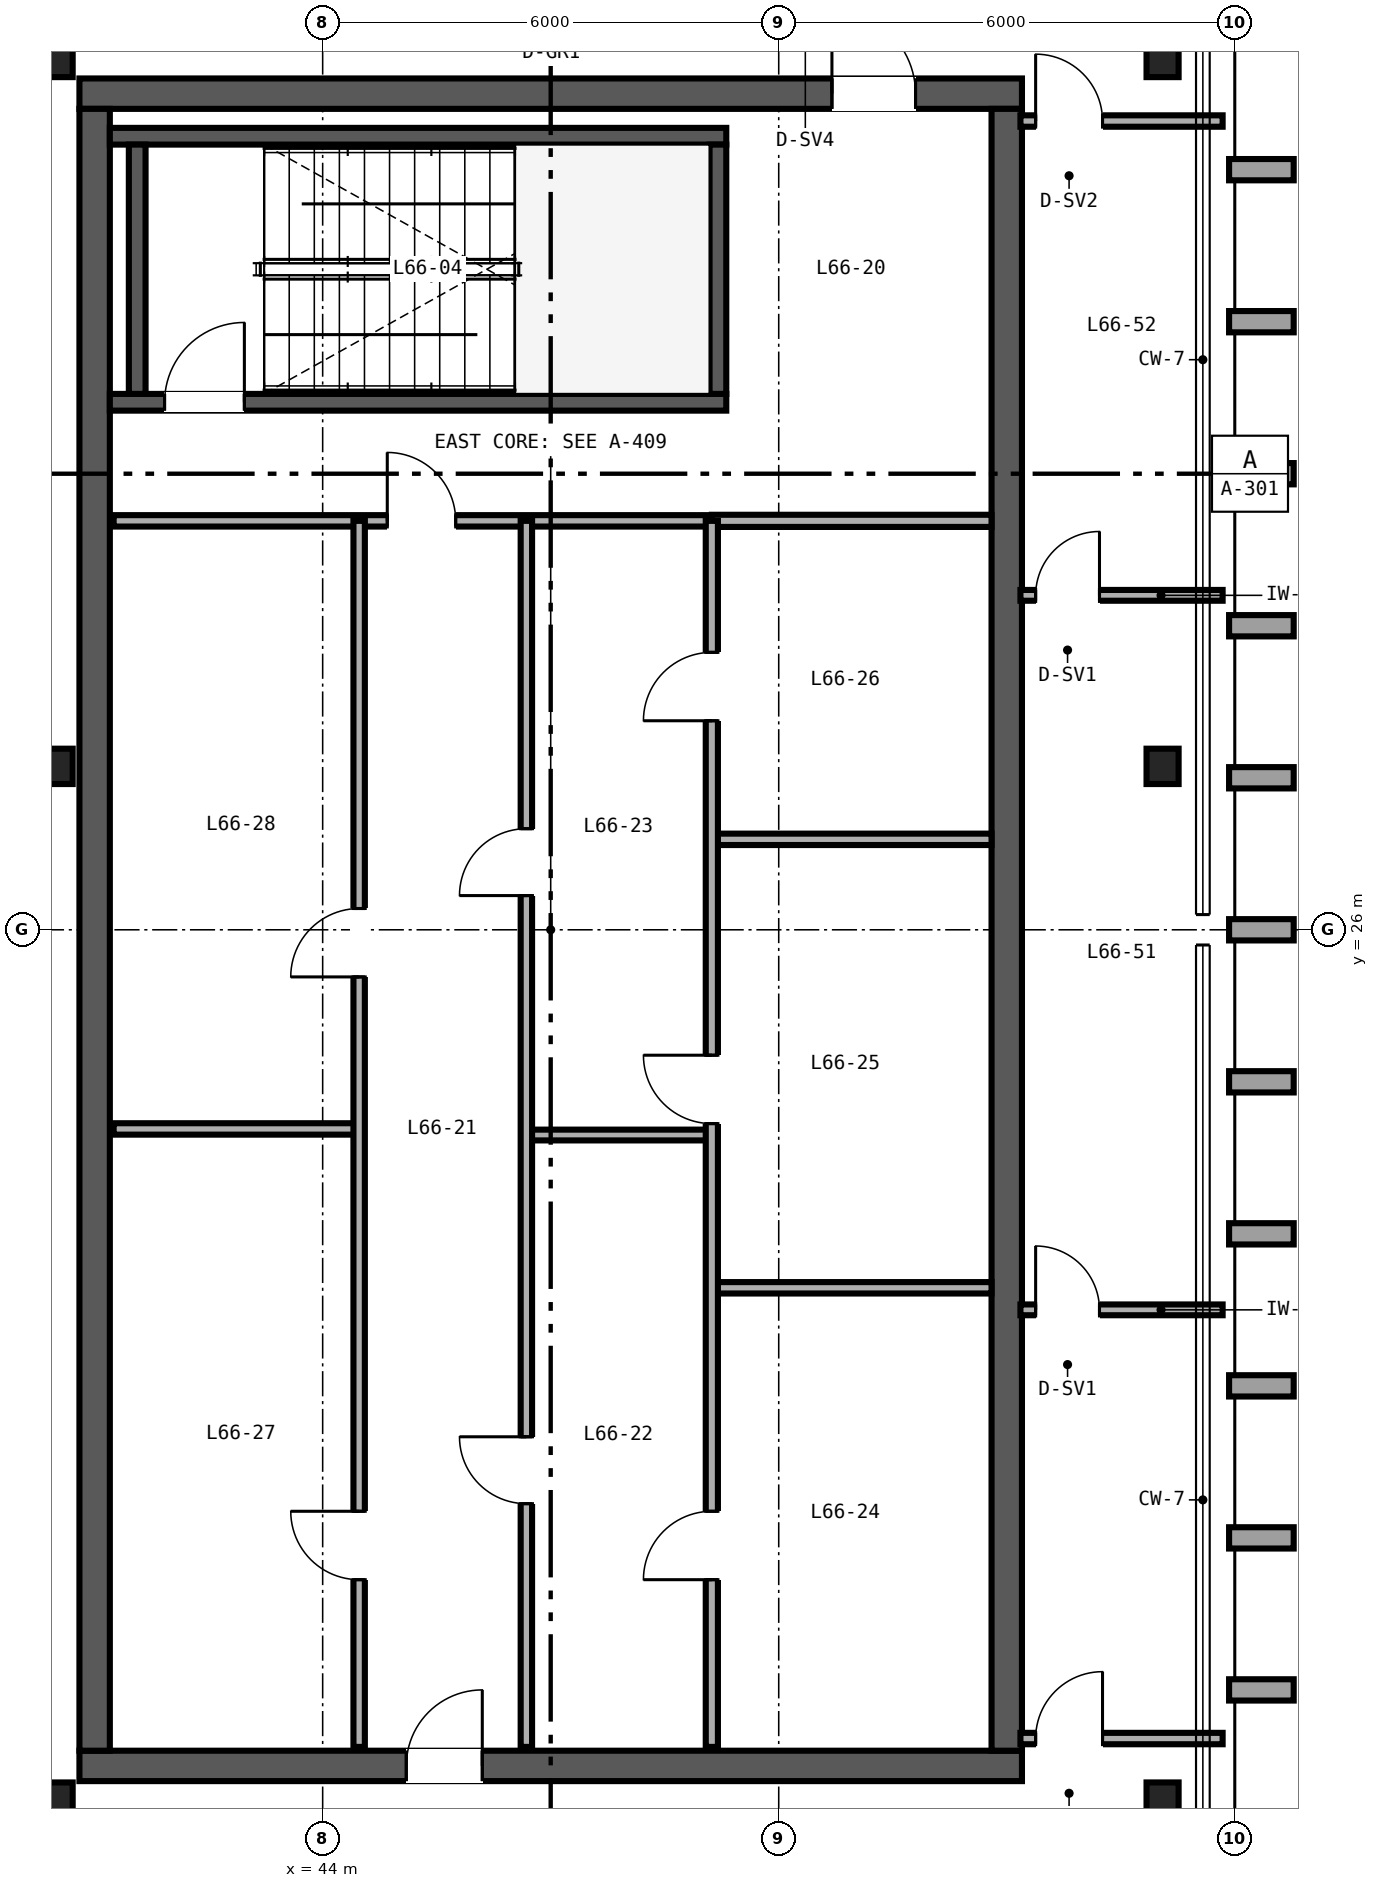
"""IFC4 building model, lengths in metres.
Left out: names, types, materials, properties, quantities, classifications, styles, units other than length and angle.
Written with IfcOpenShell. Run it as: python <this file> out.ifc"""

import sys

from ifc_helpers import new_model, si_unit, direction, frame, frame_2d, origin, origin_2d, place, context, subcontext, project, spatial, rectangle, i_section, extrude, source, transform, mapped, element, fill, save


model = new_model("IFC4")
c1 = context("Model", 3, precision=1e-05, world=origin(), true_north=direction((0.0, 1.0)))
c2 = subcontext(c1, "Body", "Model", "MODEL_VIEW")
j1 = project(units=[si_unit("LENGTHUNIT", "METRE"), si_unit("PLANEANGLEUNIT", "RADIAN")], contexts=[c1])
p1 = place(None, origin())
s1 = spatial("IfcSite", under=j1, at=p1, CompositionType="ELEMENT")
p2 = place(p1, origin())
s2 = spatial("IfcBuilding", under=s1, at=p2, CompositionType="ELEMENT")
p3 = place(p2, frame((0.0, 0.0, 261.6)))
s3 = spatial("IfcBuildingStorey", under=s2, at=p3, CompositionType="ELEMENT", Elevation=261.6)
p4 = place(p3, frame((40.8, 15.0, 0.0), z_axis=(0.0, 0.0, 1.0), x_axis=(1.0, 0.0, 0.0)))
e1 = element("IfcWall", 1, at=p4, inside=s3, PredefinedType="SHEAR", context=c2, shape_type="SweptSolid", body=[
    extrude(rectangle(XDim=12.4, YDim=0.4, at=frame_2d((6.2, 0.0))), origin(), (0.0, 0.0, 1.0), 3.38),
])
p5 = place(p4, frame((4.3, 0.0, 0.0)))
e2 = element("IfcOpeningElement", 2, at=p5, cuts=e1, PredefinedType="OPENING", context=c2, shape_type="SweptSolid", body=[
    extrude(rectangle(XDim=1.0, YDim=2.15, at=frame_2d((0.5, 1.075))), frame((0.0, 0.21, 0.0), z_axis=(0.0, -1.0, 0.0), x_axis=(1.0, 0.0, 0.0)), (0.0, 0.0, 1.0), 0.42),
])
p6 = place(p3, frame((40.8, 37.0, 0.0), z_axis=(0.0, 0.0, 1.0), x_axis=(1.0, 0.0, 0.0)))
e3 = element("IfcWall", 3, at=p6, inside=s3, PredefinedType="SHEAR", context=c2, shape_type="SweptSolid", body=[
    extrude(rectangle(XDim=12.4, YDim=0.4, at=frame_2d((6.2, 0.0))), origin(), (0.0, 0.0, 1.0), 3.38),
])
p7 = place(p6, frame((9.9, 0.0, 0.0)))
e4 = element("IfcOpeningElement", 4, at=p7, cuts=e3, PredefinedType="OPENING", context=c2, shape_type="SweptSolid", body=[
    extrude(rectangle(XDim=1.1, YDim=2.15, at=frame_2d((0.55, 1.075))), frame((0.0, 0.21, 0.0), z_axis=(0.0, -1.0, 0.0), x_axis=(1.0, 0.0, 0.0)), (0.0, 0.0, 1.0), 0.42),
])
for number, where, z_axis, x_axis in (
    (5, (41.0, 15.2, 0.0), (0.0, 0.0, 1.0), (0.0, 1.0, 0.0)),
    (6, (53.0, 15.2, 0.0), (0.0, 0.0, 1.0), (0.0, 1.0, 0.0)),
):
    element("IfcWall", number, at=place(p3, frame(where, z_axis=z_axis, x_axis=x_axis)), inside=s3, PredefinedType="SHEAR", context=c2, shape_type="SweptSolid", body=[
        extrude(rectangle(XDim=21.6, YDim=0.4, at=frame_2d((10.8, 0.0))), origin(), (0.0, 0.0, 1.0), 3.38),
    ])
p8 = place(p3, frame((41.2, 32.94, 0.0), z_axis=(0.0, 0.0, 1.0), x_axis=(1.0, 0.0, 0.0)))
e7 = element("IfcWall", 7, at=p8, inside=s3, PredefinedType="SHEAR", context=c2, shape_type="SweptSolid", body=[
    extrude(rectangle(XDim=8.11, YDim=0.22, at=frame_2d((4.055, 0.0))), origin(), (0.0, 0.0, 1.0), 3.4),
])
p9 = place(p8, frame((0.72, 0.0, 0.0)))
e8 = element("IfcOpeningElement", 8, at=p9, cuts=e7, PredefinedType="OPENING", context=c2, shape_type="SweptSolid", body=[
    extrude(rectangle(XDim=1.05, YDim=2.15, at=frame_2d((0.525, 1.075))), frame((0.0, 0.12, 0.0), z_axis=(0.0, -1.0, 0.0), x_axis=(1.0, 0.0, 0.0)), (0.0, 0.0, 1.0), 0.24),
])
p10 = place(p3, frame((41.2, 36.44, 0.0), z_axis=(0.0, 0.0, 1.0), x_axis=(1.0, 0.0, 0.0)))
e9 = element("IfcWall", 9, at=p10, inside=s3, PredefinedType="SHEAR", context=c2, shape_type="SweptSolid", body=[
    extrude(rectangle(XDim=8.11, YDim=0.22, at=frame_2d((4.055, 0.0))), origin(), (0.0, 0.0, 1.0), 3.4),
])
for number, where, z_axis, x_axis in (
    (10, (41.56, 33.05, 0.0), (0.0, 0.0, 1.0), (0.0, 1.0, 0.0)),
    (11, (49.2, 33.05, 0.0), (0.0, 0.0, 1.0), (0.0, 1.0, 0.0)),
):
    element("IfcWall", number, at=place(p3, frame(where, z_axis=z_axis, x_axis=x_axis)), inside=s3, PredefinedType="SHEAR", context=c2, shape_type="SweptSolid", body=[
        extrude(rectangle(XDim=3.28, YDim=0.22, at=frame_2d((1.64, 0.0))), origin(), (0.0, 0.0, 1.0), 3.4),
    ])
m1 = source(origin(), c2, "Body", "SweptSolid", [
    extrude(i_section(OverallWidth=0.422, OverallDepth=0.465, WebThickness=0.045, FlangeThickness=0.073, FilletRadius=0.025, at=origin_2d()), origin(), (0.0, 0.0, 1.0), 3.38),
])
for number, where, z_axis, x_axis in (
    (12, (40.5, 14.55, 0.0), (0.0, 0.0, 1.0), (1.0, 0.0, 0.0)),
    (13, (55.05, 14.55, 0.0), (0.0, 0.0, 1.0), (1.0, 0.0, 0.0)),
    (14, (40.5, 28.15, 0.0), (0.0, 0.0, 1.0), (1.0, 0.0, 0.0)),
    (15, (55.05, 28.15, 0.0), (0.0, 0.0, 1.0), (1.0, 0.0, 0.0)),
    (16, (40.5, 37.45, 0.0), (0.0, 0.0, 1.0), (1.0, 0.0, 0.0)),
    (17, (55.05, 37.45, 0.0), (0.0, 0.0, 1.0), (1.0, 0.0, 0.0)),
):
    element("IfcColumn", number, at=place(p3, frame(where, z_axis=z_axis, x_axis=x_axis)), inside=s3, PredefinedType="COLUMN", context=c2, shape_type="MappedRepresentation", body=[
        mapped(m1, transform((0.0, 0.0, 0.0), scale=1.0)),
    ])
p11 = place(p3, frame((41.25, 31.38, 0.0), z_axis=(0.0, 0.0, 1.0), x_axis=(1.0, 0.0, 0.0)))
e18 = element("IfcWall", 18, at=p11, inside=s3, PredefinedType="PARTITIONING", context=c2, shape_type="SweptSolid", body=[
    extrude(rectangle(XDim=7.87, YDim=0.15, at=frame_2d((3.935, 0.0))), origin(), (0.0, 0.0, 1.0), 2.48),
])
p12 = place(p11, frame((3.6, 0.0, 0.0)))
e19 = element("IfcOpeningElement", 19, at=p12, cuts=e18, PredefinedType="OPENING", context=c2, shape_type="SweptSolid", body=[
    extrude(rectangle(XDim=0.9, YDim=2.15, at=frame_2d((0.45, 1.075))), frame((0.0, 0.085, 0.0), z_axis=(0.0, -1.0, 0.0), x_axis=(1.0, 0.0, 0.0)), (0.0, 0.0, 1.0), 0.17),
])
p13 = place(p3, frame((46.68, 23.3, 0.0), z_axis=(0.0, 0.0, 1.0), x_axis=(1.0, 0.0, 0.0)))
e20 = element("IfcWall", 20, at=p13, inside=s3, PredefinedType="PARTITIONING", context=c2, shape_type="SweptSolid", body=[
    extrude(rectangle(XDim=2.44, YDim=0.142, at=frame_2d((1.22, 0.0))), origin(), (0.0, 0.0, 1.0), 3.38),
])
p14 = place(p3, frame((46.68, 15.25, 0.0), z_axis=(0.0, 0.0, 1.0), x_axis=(0.0, 1.0, 0.0)))
e21 = element("IfcWall", 21, at=p14, inside=s3, PredefinedType="PARTITIONING", context=c2, shape_type="SweptSolid", body=[
    extrude(rectangle(XDim=16.13, YDim=0.15, at=frame_2d((8.065, 0.0))), origin(), (0.0, 0.0, 1.0), 2.453),
])
p15 = place(p14, frame((3.2, 0.0, 0.0)))
e22 = element("IfcOpeningElement", 22, at=p15, cuts=e21, PredefinedType="OPENING", context=c2, shape_type="SweptSolid", body=[
    extrude(rectangle(XDim=0.88, YDim=2.15, at=frame_2d((0.44, 1.075))), frame((0.0, 0.085, 0.0), z_axis=(0.0, -1.0, 0.0), x_axis=(1.0, 0.0, 0.0)), (0.0, 0.0, 1.0), 0.17),
])
p16 = place(p14, frame((11.2, 0.0, 0.0)))
e23 = element("IfcOpeningElement", 23, at=p16, cuts=e21, PredefinedType="OPENING", context=c2, shape_type="SweptSolid", body=[
    extrude(rectangle(XDim=0.88, YDim=2.15, at=frame_2d((0.44, 1.075))), frame((0.0, 0.085, 0.0), z_axis=(0.0, -1.0, 0.0), x_axis=(1.0, 0.0, 0.0)), (0.0, 0.0, 1.0), 0.17),
])
p17 = place(p3, frame((49.12, 31.38, 0.0), z_axis=(0.0, 0.0, 1.0), x_axis=(1.0, 0.0, 0.0)))
e24 = element("IfcWall", 24, at=p17, inside=s3, PredefinedType="PARTITIONING", context=c2, shape_type="SweptSolid", body=[
    extrude(rectangle(XDim=3.68, YDim=0.16, at=frame_2d((1.84, 0.0))), origin(), (0.0, 0.0, 1.0), 2.48),
])
for number, where, z_axis, x_axis in (
    (25, (49.12, 21.29, 0.0), (0.0, 0.0, 1.0), (1.0, 0.0, 0.0)),
    (26, (49.12, 27.19, 0.0), (0.0, 0.0, 1.0), (1.0, 0.0, 0.0)),
):
    element("IfcWall", number, at=place(p3, frame(where, z_axis=z_axis, x_axis=x_axis)), inside=s3, PredefinedType="PARTITIONING", context=c2, shape_type="SweptSolid", body=[
        extrude(rectangle(XDim=3.68, YDim=0.15, at=frame_2d((1.84, 0.0))), origin(), (0.0, 0.0, 1.0), 3.38),
    ])
p18 = place(p3, frame((49.12, 15.25, 0.0), z_axis=(0.0, 0.0, 1.0), x_axis=(0.0, 1.0, 0.0)))
e27 = element("IfcWall", 27, at=p18, inside=s3, PredefinedType="PARTITIONING", context=c2, shape_type="SweptSolid", body=[
    extrude(rectangle(XDim=16.13, YDim=0.16, at=frame_2d((8.065, 0.0))), origin(), (0.0, 0.0, 1.0), 2.453),
])
p19 = place(p18, frame((2.2, 0.0, 0.0)))
e28 = element("IfcOpeningElement", 28, at=p19, cuts=e27, PredefinedType="OPENING", context=c2, shape_type="SweptSolid", body=[
    extrude(rectangle(XDim=0.9, YDim=2.15, at=frame_2d((0.45, 1.075))), frame((0.0, 0.09, 0.0), z_axis=(0.0, -1.0, 0.0), x_axis=(1.0, 0.0, 0.0)), (0.0, 0.0, 1.0), 0.18),
])
p20 = place(p18, frame((8.2, 0.0, 0.0)))
e29 = element("IfcOpeningElement", 29, at=p20, cuts=e27, PredefinedType="OPENING", context=c2, shape_type="SweptSolid", body=[
    extrude(rectangle(XDim=0.9, YDim=2.15, at=frame_2d((0.45, 1.075))), frame((0.0, 0.09, 0.0), z_axis=(0.0, -1.0, 0.0), x_axis=(1.0, 0.0, 0.0)), (0.0, 0.0, 1.0), 0.18),
])
p21 = place(p18, frame((13.5, 0.0, 0.0)))
e30 = element("IfcOpeningElement", 30, at=p21, cuts=e27, PredefinedType="OPENING", context=c2, shape_type="SweptSolid", body=[
    extrude(rectangle(XDim=0.9, YDim=2.15, at=frame_2d((0.45, 1.075))), frame((0.0, 0.09, 0.0), z_axis=(0.0, -1.0, 0.0), x_axis=(1.0, 0.0, 0.0)), (0.0, 0.0, 1.0), 0.18),
])
p22 = place(p3, frame((41.25, 23.38, 0.0), z_axis=(0.0, 0.0, 1.0), x_axis=(1.0, 0.0, 0.0)))
e31 = element("IfcWall", 31, at=p22, inside=s3, PredefinedType="PARTITIONING", context=c2, shape_type="SweptSolid", body=[
    extrude(rectangle(XDim=3.23, YDim=0.15, at=frame_2d((1.615, 0.0))), origin(), (0.0, 0.0, 1.0), 3.38),
])
p23 = place(p3, frame((44.48, 15.25, 0.0), z_axis=(0.0, 0.0, 1.0), x_axis=(0.0, 1.0, 0.0)))
e32 = element("IfcWall", 32, at=p23, inside=s3, PredefinedType="PARTITIONING", context=c2, shape_type="SweptSolid", body=[
    extrude(rectangle(XDim=16.13, YDim=0.15, at=frame_2d((8.065, 0.0))), origin(), (0.0, 0.0, 1.0), 2.453),
])
p24 = place(p23, frame((2.2, 0.0, 0.0)))
e33 = element("IfcOpeningElement", 33, at=p24, cuts=e32, PredefinedType="OPENING", context=c2, shape_type="SweptSolid", body=[
    extrude(rectangle(XDim=0.9, YDim=2.15, at=frame_2d((0.45, 1.075))), frame((0.0, 0.085, 0.0), z_axis=(0.0, -1.0, 0.0), x_axis=(1.0, 0.0, 0.0)), (0.0, 0.0, 1.0), 0.17),
])
p25 = place(p23, frame((10.13, 0.0, 0.0)))
e34 = element("IfcOpeningElement", 34, at=p25, cuts=e32, PredefinedType="OPENING", context=c2, shape_type="SweptSolid", body=[
    extrude(rectangle(XDim=0.9, YDim=2.15, at=frame_2d((0.45, 1.075))), frame((0.0, 0.085, 0.0), z_axis=(0.0, -1.0, 0.0), x_axis=(1.0, 0.0, 0.0)), (0.0, 0.0, 1.0), 0.17),
])
p26 = place(p3, frame((53.18, 15.36, 0.0), z_axis=(0.0, 0.0, 1.0), x_axis=(1.0, 0.0, 0.0)))
e35 = element("IfcWall", 35, at=p26, inside=s3, PredefinedType="PARTITIONING", context=c2, shape_type="SweptSolid", body=[
    extrude(rectangle(XDim=2.66, YDim=0.15, at=frame_2d((1.33, 0.0))), origin(), (0.0, 0.0, 1.0), 2.601),
])
p27 = place(p26, frame((0.2, 0.0, 0.0)))
e36 = element("IfcOpeningElement", 36, at=p27, cuts=e35, PredefinedType="OPENING", context=c2, shape_type="SweptSolid", body=[
    extrude(rectangle(XDim=0.88, YDim=2.15, at=frame_2d((0.44, 1.075))), frame((0.0, 0.085, 0.0), z_axis=(0.0, -1.0, 0.0), x_axis=(1.0, 0.0, 0.0)), (0.0, 0.0, 1.0), 0.17),
])
p28 = place(p3, frame((53.18, 36.64, 0.0), z_axis=(0.0, 0.0, 1.0), x_axis=(1.0, 0.0, 0.0)))
e37 = element("IfcWall", 37, at=p28, inside=s3, PredefinedType="PARTITIONING", context=c2, shape_type="SweptSolid", body=[
    extrude(rectangle(XDim=2.66, YDim=0.15, at=frame_2d((1.33, 0.0))), origin(), (0.0, 0.0, 1.0), 2.763),
])
p29 = place(p28, frame((0.2, 0.0, 0.0)))
e38 = element("IfcOpeningElement", 38, at=p29, cuts=e37, PredefinedType="OPENING", context=c2, shape_type="SweptSolid", body=[
    extrude(rectangle(XDim=0.88, YDim=2.15, at=frame_2d((0.44, 1.075))), frame((0.0, 0.085, 0.0), z_axis=(0.0, -1.0, 0.0), x_axis=(1.0, 0.0, 0.0)), (0.0, 0.0, 1.0), 0.17),
])
p30 = place(p3, frame((53.18, 21.0, 0.0), z_axis=(0.0, 0.0, 1.0), x_axis=(1.0, 0.0, 0.0)))
e39 = element("IfcWall", 39, at=p30, inside=s3, PredefinedType="PARTITIONING", context=c2, shape_type="SweptSolid", body=[
    extrude(rectangle(XDim=2.66, YDim=0.142, at=frame_2d((1.33, 0.0))), origin(), (0.0, 0.0, 1.0), 2.601),
])
p31 = place(p30, frame((0.2, 0.0, 0.0)))
e40 = element("IfcOpeningElement", 40, at=p31, cuts=e39, PredefinedType="OPENING", context=c2, shape_type="SweptSolid", body=[
    extrude(rectangle(XDim=0.84, YDim=2.1, at=frame_2d((0.42, 1.05))), frame((0.0, 0.081, 0.0), z_axis=(0.0, -1.0, 0.0), x_axis=(1.0, 0.0, 0.0)), (0.0, 0.0, 1.0), 0.162),
])
p32 = place(p3, frame((53.18, 30.4, 0.0), z_axis=(0.0, 0.0, 1.0), x_axis=(1.0, 0.0, 0.0)))
e41 = element("IfcWall", 41, at=p32, inside=s3, PredefinedType="PARTITIONING", context=c2, shape_type="SweptSolid", body=[
    extrude(rectangle(XDim=2.66, YDim=0.142, at=frame_2d((1.33, 0.0))), origin(), (0.0, 0.0, 1.0), 2.763),
])
p33 = place(p32, frame((0.2, 0.0, 0.0)))
e42 = element("IfcOpeningElement", 42, at=p33, cuts=e41, PredefinedType="OPENING", context=c2, shape_type="SweptSolid", body=[
    extrude(rectangle(XDim=0.84, YDim=2.1, at=frame_2d((0.42, 1.05))), frame((0.0, 0.081, 0.0), z_axis=(0.0, -1.0, 0.0), x_axis=(1.0, 0.0, 0.0)), (0.0, 0.0, 1.0), 0.162),
])
m2 = source(origin(), c2, "Body", "SweptSolid", [
    extrude(rectangle(XDim=1.05, YDim=2.15, at=frame_2d((0.525, 1.075))), frame((0.0, 0.025, 0.0), z_axis=(0.0, -1.0, 0.0), x_axis=(1.0, 0.0, 0.0)), (0.0, 0.0, 1.0), 0.05),
])
p34 = place(p9, origin())
e43 = element("IfcDoor", 43, at=p34, inside=s3, OperationType="SINGLE_SWING_RIGHT", PredefinedType="DOOR", context=c2, shape_type="MappedRepresentation", body=[
    mapped(m2, transform((0.0, 0.0, 0.0), scale=1.0)),
])
fill(e8, e43)
m3 = source(origin(), c2, "Body", "SweptSolid", [
    extrude(rectangle(XDim=0.88, YDim=2.15, at=frame_2d((0.44, 1.075))), frame((0.0, 0.025, 0.0), z_axis=(0.0, -1.0, 0.0), x_axis=(1.0, 0.0, 0.0)), (0.0, 0.0, 1.0), 0.05),
])
p35 = place(p15, origin())
e44 = element("IfcDoor", 44, at=p35, inside=s3, OperationType="SINGLE_SWING_RIGHT", PredefinedType="DOOR", context=c2, shape_type="MappedRepresentation", body=[
    mapped(m3, transform((0.0, 0.0, 0.0), scale=1.0)),
])
fill(e22, e44)
p36 = place(p16, origin())
e45 = element("IfcDoor", 45, at=p36, inside=s3, OperationType="SINGLE_SWING_LEFT", PredefinedType="DOOR", context=c2, shape_type="MappedRepresentation", body=[
    mapped(m3, transform((0.0, 0.0, 0.0), scale=1.0)),
])
fill(e23, e45)
m4 = source(origin(), c2, "Body", "SweptSolid", [
    extrude(rectangle(XDim=0.9, YDim=2.15, at=frame_2d((0.45, 1.075))), frame((0.0, 0.025, 0.0), z_axis=(0.0, -1.0, 0.0), x_axis=(1.0, 0.0, 0.0)), (0.0, 0.0, 1.0), 0.05),
])
p37 = place(p12, origin())
e46 = element("IfcDoor", 46, at=p37, inside=s3, OperationType="SINGLE_SWING_LEFT", PredefinedType="DOOR", context=c2, shape_type="MappedRepresentation", body=[
    mapped(m4, transform((0.0, 0.0, 0.0), scale=1.0)),
])
fill(e19, e46)
m5 = source(origin(), c2, "Body", "SweptSolid", [
    extrude(rectangle(XDim=1.0, YDim=2.15, at=frame_2d((0.5, 1.075))), frame((0.0, 0.025, 0.0), z_axis=(0.0, -1.0, 0.0), x_axis=(1.0, 0.0, 0.0)), (0.0, 0.0, 1.0), 0.05),
])
p38 = place(p5, origin())
e47 = element("IfcDoor", 47, at=p38, inside=s3, OperationType="SINGLE_SWING_RIGHT", PredefinedType="DOOR", context=c2, shape_type="MappedRepresentation", body=[
    mapped(m5, transform((0.0, 0.0, 0.0), scale=1.0)),
])
fill(e2, e47)
m6 = source(origin(), c2, "Body", "SweptSolid", [
    extrude(rectangle(XDim=1.1, YDim=2.15, at=frame_2d((0.55, 1.075))), frame((0.0, 0.025, 0.0), z_axis=(0.0, -1.0, 0.0), x_axis=(1.0, 0.0, 0.0)), (0.0, 0.0, 1.0), 0.05),
])
p39 = place(p7, origin())
e48 = element("IfcDoor", 48, at=p39, inside=s3, OperationType="SINGLE_SWING_LEFT", PredefinedType="DOOR", context=c2, shape_type="MappedRepresentation", body=[
    mapped(m6, transform((0.0, 0.0, 0.0), scale=1.0)),
])
fill(e4, e48)
p40 = place(p19, origin())
e49 = element("IfcDoor", 49, at=p40, inside=s3, OperationType="SINGLE_SWING_LEFT", PredefinedType="DOOR", context=c2, shape_type="MappedRepresentation", body=[
    mapped(m4, transform((0.0, 0.0, 0.0), scale=1.0)),
])
fill(e28, e49)
p41 = place(p20, origin())
e50 = element("IfcDoor", 50, at=p41, inside=s3, OperationType="SINGLE_SWING_RIGHT", PredefinedType="DOOR", context=c2, shape_type="MappedRepresentation", body=[
    mapped(m4, transform((0.0, 0.0, 0.0), scale=1.0)),
])
fill(e29, e50)
p42 = place(p21, origin())
e51 = element("IfcDoor", 51, at=p42, inside=s3, OperationType="SINGLE_SWING_LEFT", PredefinedType="DOOR", context=c2, shape_type="MappedRepresentation", body=[
    mapped(m4, transform((0.0, 0.0, 0.0), scale=1.0)),
])
fill(e30, e51)
p43 = place(p24, origin())
e52 = element("IfcDoor", 52, at=p43, inside=s3, OperationType="SINGLE_SWING_RIGHT", PredefinedType="DOOR", context=c2, shape_type="MappedRepresentation", body=[
    mapped(m4, transform((0.0, 0.0, 0.0), scale=1.0)),
])
fill(e33, e52)
p44 = place(p25, origin())
e53 = element("IfcDoor", 53, at=p44, inside=s3, OperationType="SINGLE_SWING_LEFT", PredefinedType="DOOR", context=c2, shape_type="MappedRepresentation", body=[
    mapped(m4, transform((0.0, 0.0, 0.0), scale=1.0)),
])
fill(e34, e53)
p45 = place(p27, origin())
e54 = element("IfcDoor", 54, at=p45, inside=s3, OperationType="SINGLE_SWING_RIGHT", PredefinedType="DOOR", context=c2, shape_type="MappedRepresentation", body=[
    mapped(m3, transform((0.0, 0.0, 0.0), scale=1.0)),
])
fill(e36, e54)
p46 = place(p29, origin())
e55 = element("IfcDoor", 55, at=p46, inside=s3, OperationType="SINGLE_SWING_LEFT", PredefinedType="DOOR", context=c2, shape_type="MappedRepresentation", body=[
    mapped(m3, transform((0.0, 0.0, 0.0), scale=1.0)),
])
fill(e38, e55)
m7 = source(origin(), c2, "Body", "SweptSolid", [
    extrude(rectangle(XDim=0.84, YDim=2.1, at=frame_2d((0.42, 1.05))), frame((0.0, 0.025, 0.0), z_axis=(0.0, -1.0, 0.0), x_axis=(1.0, 0.0, 0.0)), (0.0, 0.0, 1.0), 0.05),
])
p47 = place(p31, origin())
e56 = element("IfcDoor", 56, at=p47, inside=s3, OperationType="SINGLE_SWING_LEFT", PredefinedType="DOOR", context=c2, shape_type="MappedRepresentation", body=[
    mapped(m7, transform((0.0, 0.0, 0.0), scale=1.0)),
])
fill(e40, e56)
p48 = place(p33, origin())
e57 = element("IfcDoor", 57, at=p48, inside=s3, OperationType="SINGLE_SWING_RIGHT", PredefinedType="DOOR", context=c2, shape_type="MappedRepresentation", body=[
    mapped(m7, transform((0.0, 0.0, 0.0), scale=1.0)),
])
fill(e42, e57)
save(model, sys.argv[1])
